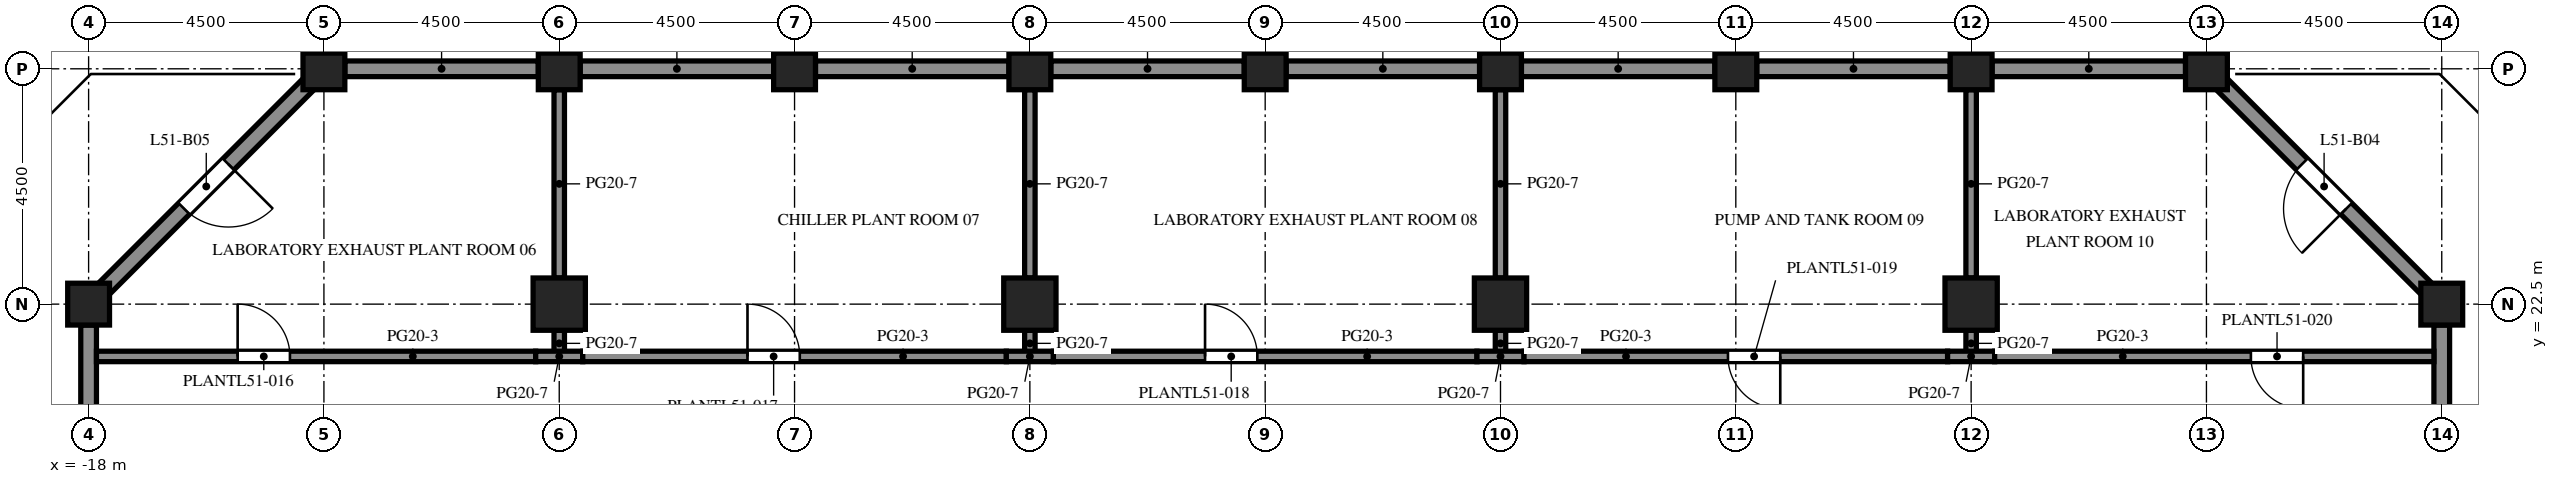
"""IFC4 building model, lengths in metres.
Left out: names, types, materials, properties, quantities, classifications, styles, units other than length and angle.
Written with IfcOpenShell. Run it as: python <this file> out.ifc"""

import sys

from ifc_helpers import new_model, si_unit, direction, frame, frame_2d, origin, origin_2d, place, context, subcontext, project, spatial, rectangle, extrude, element, fill, save


model = new_model("IFC4")
c1 = context("Model", 3, precision=1e-05, world=origin(), true_north=direction((0.0, 1.0)))
c2 = subcontext(c1, "Body", "Model", "MODEL_VIEW")
j1 = project(units=[si_unit("LENGTHUNIT", "METRE"), si_unit("PLANEANGLEUNIT", "RADIAN")], contexts=[c1])
p1 = place(None, origin())
s1 = spatial("IfcSite", under=j1, at=p1, CompositionType="ELEMENT")
p2 = place(p1, origin())
s2 = spatial("IfcBuilding", under=s1, at=p2, CompositionType="ELEMENT")
p3 = place(p2, frame((0.0, 0.0, 226.2)))
s3 = spatial("IfcBuildingStorey", under=s2, at=p3, CompositionType="ELEMENT", Elevation=226.2)
p4 = place(p3, frame((-18.0, 22.5, -0.6), z_axis=(0.0, 0.0, 1.0), x_axis=(1.0, 0.0, 0.0)))
e1 = element("IfcColumn", 1, at=p4, inside=s3, PredefinedType="COLUMN", context=c2, shape_type="SweptSolid", body=[
    extrude(rectangle(XDim=0.8, YDim=0.8, at=origin_2d()), origin(), (0.0, 0.0, 1.0), 6.0),
])
p5 = place(p3, frame((-13.5, 27.0, 0.0), z_axis=(0.0, 0.0, 1.0), x_axis=(1.0, 0.0, 0.0)))
e2 = element("IfcColumn", 2, at=p5, inside=s3, PredefinedType="COLUMN", context=c2, shape_type="SweptSolid", body=[
    extrude(rectangle(XDim=0.8, YDim=0.8, at=origin_2d()), origin(), (0.0, 0.0, 1.0), 5.4),
])
p6 = place(p3, frame((-9.0, 27.0, 0.0), z_axis=(0.0, 0.0, 1.0), x_axis=(1.0, 0.0, 0.0)))
e3 = element("IfcColumn", 3, at=p6, inside=s3, PredefinedType="COLUMN", context=c2, shape_type="SweptSolid", body=[
    extrude(rectangle(XDim=0.8, YDim=0.8, at=origin_2d()), origin(), (0.0, 0.0, 1.0), 4.95),
])
p7 = place(p3, frame((-4.5, 27.0, 0.0), z_axis=(0.0, 0.0, 1.0), x_axis=(1.0, 0.0, 0.0)))
e4 = element("IfcColumn", 4, at=p7, inside=s3, PredefinedType="COLUMN", context=c2, shape_type="SweptSolid", body=[
    extrude(rectangle(XDim=0.8, YDim=0.8, at=origin_2d()), origin(), (0.0, 0.0, 1.0), 5.4),
])
p8 = place(p3, frame((0.0, 27.0, 0.0), z_axis=(0.0, 0.0, 1.0), x_axis=(1.0, 0.0, 0.0)))
e5 = element("IfcColumn", 5, at=p8, inside=s3, PredefinedType="COLUMN", context=c2, shape_type="SweptSolid", body=[
    extrude(rectangle(XDim=0.8, YDim=0.8, at=origin_2d()), origin(), (0.0, 0.0, 1.0), 4.95),
])
p9 = place(p3, frame((4.5, 27.0, 0.0), z_axis=(0.0, 0.0, 1.0), x_axis=(1.0, 0.0, 0.0)))
e6 = element("IfcColumn", 6, at=p9, inside=s3, PredefinedType="COLUMN", context=c2, shape_type="SweptSolid", body=[
    extrude(rectangle(XDim=0.8, YDim=0.8, at=origin_2d()), origin(), (0.0, 0.0, 1.0), 5.4),
])
p10 = place(p3, frame((9.0, 27.0, 0.0), z_axis=(0.0, 0.0, 1.0), x_axis=(1.0, 0.0, 0.0)))
e7 = element("IfcColumn", 7, at=p10, inside=s3, PredefinedType="COLUMN", context=c2, shape_type="SweptSolid", body=[
    extrude(rectangle(XDim=0.8, YDim=0.8, at=origin_2d()), origin(), (0.0, 0.0, 1.0), 4.95),
])
p11 = place(p3, frame((13.5, 27.0, 0.0), z_axis=(0.0, 0.0, 1.0), x_axis=(1.0, 0.0, 0.0)))
e8 = element("IfcColumn", 8, at=p11, inside=s3, PredefinedType="COLUMN", context=c2, shape_type="SweptSolid", body=[
    extrude(rectangle(XDim=0.8, YDim=0.8, at=origin_2d()), origin(), (0.0, 0.0, 1.0), 5.4),
])
p12 = place(p3, frame((18.0, 27.0, 0.0), z_axis=(0.0, 0.0, 1.0), x_axis=(1.0, 0.0, 0.0)))
e9 = element("IfcColumn", 9, at=p12, inside=s3, PredefinedType="COLUMN", context=c2, shape_type="SweptSolid", body=[
    extrude(rectangle(XDim=0.8, YDim=0.8, at=origin_2d()), origin(), (0.0, 0.0, 1.0), 4.95),
])
p13 = place(p3, frame((22.5, 27.0, 0.0), z_axis=(0.0, 0.0, 1.0), x_axis=(1.0, 0.0, 0.0)))
e10 = element("IfcColumn", 10, at=p13, inside=s3, PredefinedType="COLUMN", context=c2, shape_type="SweptSolid", body=[
    extrude(rectangle(XDim=0.8, YDim=0.8, at=origin_2d()), origin(), (0.0, 0.0, 1.0), 5.4),
])
p14 = place(p3, frame((27.0, 22.5, -0.6), z_axis=(0.0, 0.0, 1.0), x_axis=(1.0, 0.0, 0.0)))
e11 = element("IfcColumn", 11, at=p14, inside=s3, PredefinedType="COLUMN", context=c2, shape_type="SweptSolid", body=[
    extrude(rectangle(XDim=0.8, YDim=0.8, at=origin_2d()), origin(), (0.0, 0.0, 1.0), 6.0),
])
for number, where, z_axis, x_axis in (
    (12, (-9.0, 22.5, 0.0), (0.0, 0.0, 1.0), (1.0, 0.0, 0.0)),
    (13, (0.0, 22.5, 0.0), (0.0, 0.0, 1.0), (1.0, 0.0, 0.0)),
    (14, (9.0, 22.5, 0.0), (0.0, 0.0, 1.0), (1.0, 0.0, 0.0)),
    (15, (18.0, 22.5, 0.0), (0.0, 0.0, 1.0), (1.0, 0.0, 0.0)),
):
    element("IfcColumn", number, at=place(p3, frame(where, z_axis=z_axis, x_axis=x_axis)), inside=s3, PredefinedType="COLUMN", context=c2, shape_type="SweptSolid", body=[
        extrude(rectangle(XDim=1.0, YDim=1.0, at=origin_2d()), origin(), (0.0, 0.0, 1.0), 4.95),
    ])
p15 = place(p3, frame((27.0, 22.1, 0.0), z_axis=(0.0, 0.0, 1.0), x_axis=(0.0, -1.0, 0.0)))
e16 = element("IfcWall", 16, at=p15, inside=s3, PredefinedType="SOLIDWALL", context=c2, shape_type="SweptSolid", body=[
    extrude(rectangle(XDim=3.7, YDim=0.3, at=frame_2d((1.85, 0.0))), origin(), (0.0, 0.0, 1.0), 3.75),
])
p16 = place(p3, frame((22.794, 26.706, 0.0), z_axis=(0.0, 0.0, 1.0), x_axis=(0.707106781187, -0.707106781187, 0.0)))
e17 = element("IfcWall", 17, at=p16, inside=s3, PredefinedType="SOLIDWALL", context=c2, shape_type="SweptSolid", body=[
    extrude(rectangle(XDim=5.532, YDim=0.3, at=frame_2d((2.766, 0.0))), origin(), (0.0, 0.0, 1.0), 3.75),
])
p17 = place(p16, frame((2.166, 0.0, 0.0)))
e18 = element("IfcOpeningElement", 18, at=p17, cuts=e17, PredefinedType="OPENING", context=c2, shape_type="SweptSolid", body=[
    extrude(rectangle(XDim=1.2, YDim=2.2, at=frame_2d((0.6, 1.1))), frame((0.0, 0.16, 0.0), z_axis=(0.0, -1.0, 0.0), x_axis=(1.0, 0.0, 0.0)), (0.0, 0.0, 1.0), 0.32),
])
for number, where, z_axis, x_axis in (
    (19, (18.4, 27.0, 0.0), (0.0, 0.0, 1.0), (1.0, 0.0, 0.0)),
    (20, (13.9, 27.0, 0.0), (0.0, 0.0, 1.0), (1.0, 0.0, 0.0)),
    (21, (9.4, 27.0, 0.0), (0.0, 0.0, 1.0), (1.0, 0.0, 0.0)),
    (22, (4.9, 27.0, 0.0), (0.0, 0.0, 1.0), (1.0, 0.0, 0.0)),
    (23, (0.4, 27.0, 0.0), (0.0, 0.0, 1.0), (1.0, 0.0, 0.0)),
    (24, (-4.1, 27.0, 0.0), (0.0, 0.0, 1.0), (1.0, 0.0, 0.0)),
    (25, (-8.6, 27.0, 0.0), (0.0, 0.0, 1.0), (1.0, 0.0, 0.0)),
    (26, (-13.1, 27.0, 0.0), (0.0, 0.0, 1.0), (1.0, 0.0, 0.0)),
):
    element("IfcWall", number, at=place(p3, frame(where, z_axis=z_axis, x_axis=x_axis)), inside=s3, PredefinedType="SOLIDWALL", context=c2, shape_type="SweptSolid", body=[
        extrude(rectangle(XDim=3.7, YDim=0.3, at=frame_2d((1.85, 0.0))), origin(), (0.0, 0.0, 1.0), 3.15),
    ])
p18 = place(p3, frame((-17.706, 22.794, 0.0), z_axis=(0.0, 0.0, 1.0), x_axis=(0.707106781187, 0.707106781187, 0.0)))
e27 = element("IfcWall", 27, at=p18, inside=s3, PredefinedType="SOLIDWALL", context=c2, shape_type="SweptSolid", body=[
    extrude(rectangle(XDim=5.532, YDim=0.3, at=frame_2d((2.766, 0.0))), origin(), (0.0, 0.0, 1.0), 3.75),
])
p19 = place(p18, frame((2.166, 0.0, 0.0)))
e28 = element("IfcOpeningElement", 28, at=p19, cuts=e27, PredefinedType="OPENING", context=c2, shape_type="SweptSolid", body=[
    extrude(rectangle(XDim=1.2, YDim=2.2, at=frame_2d((0.6, 1.1))), frame((0.0, 0.16, 0.0), z_axis=(0.0, -1.0, 0.0), x_axis=(1.0, 0.0, 0.0)), (0.0, 0.0, 1.0), 0.32),
])
p20 = place(p3, frame((-18.0, 18.4, 0.0), z_axis=(0.0, 0.0, 1.0), x_axis=(0.0, 1.0, 0.0)))
e29 = element("IfcWall", 29, at=p20, inside=s3, PredefinedType="SOLIDWALL", context=c2, shape_type="SweptSolid", body=[
    extrude(rectangle(XDim=3.7, YDim=0.3, at=frame_2d((1.85, 0.0))), origin(), (0.0, 0.0, 1.0), 3.75),
])
p21 = place(p3, frame((-9.0, 21.5, 0.0), z_axis=(0.0, 0.0, 1.0), x_axis=(0.0, 1.0, 0.0)))
e30 = element("IfcWall", 30, at=p21, inside=s3, PredefinedType="PARTITIONING", context=c2, shape_type="SweptSolid", body=[
    extrude(rectangle(XDim=0.5, YDim=0.2, at=frame_2d((0.25, 0.0))), origin(), (0.0, 0.0, 1.0), 3.12),
])
p22 = place(p3, frame((-9.0, 23.0, 0.0), z_axis=(0.0, 0.0, 1.0), x_axis=(0.0, 1.0, 0.0)))
e31 = element("IfcWall", 31, at=p22, inside=s3, PredefinedType="PARTITIONING", context=c2, shape_type="SweptSolid", body=[
    extrude(rectangle(XDim=3.6, YDim=0.2, at=frame_2d((1.8, 0.0))), origin(), (0.0, 0.0, 1.0), 3.12),
])
p23 = place(p3, frame((0.0, 21.5, 0.0), z_axis=(0.0, 0.0, 1.0), x_axis=(0.0, 1.0, 0.0)))
e32 = element("IfcWall", 32, at=p23, inside=s3, PredefinedType="PARTITIONING", context=c2, shape_type="SweptSolid", body=[
    extrude(rectangle(XDim=0.5, YDim=0.2, at=frame_2d((0.25, 0.0))), origin(), (0.0, 0.0, 1.0), 3.12),
])
p24 = place(p3, frame((0.0, 23.0, 0.0), z_axis=(0.0, 0.0, 1.0), x_axis=(0.0, 1.0, 0.0)))
e33 = element("IfcWall", 33, at=p24, inside=s3, PredefinedType="PARTITIONING", context=c2, shape_type="SweptSolid", body=[
    extrude(rectangle(XDim=3.6, YDim=0.2, at=frame_2d((1.8, 0.0))), origin(), (0.0, 0.0, 1.0), 3.12),
])
p25 = place(p3, frame((9.0, 21.5, 0.0), z_axis=(0.0, 0.0, 1.0), x_axis=(0.0, 1.0, 0.0)))
e34 = element("IfcWall", 34, at=p25, inside=s3, PredefinedType="PARTITIONING", context=c2, shape_type="SweptSolid", body=[
    extrude(rectangle(XDim=0.5, YDim=0.2, at=frame_2d((0.25, 0.0))), origin(), (0.0, 0.0, 1.0), 3.12),
])
p26 = place(p3, frame((9.0, 23.0, 0.0), z_axis=(0.0, 0.0, 1.0), x_axis=(0.0, 1.0, 0.0)))
e35 = element("IfcWall", 35, at=p26, inside=s3, PredefinedType="PARTITIONING", context=c2, shape_type="SweptSolid", body=[
    extrude(rectangle(XDim=3.6, YDim=0.2, at=frame_2d((1.8, 0.0))), origin(), (0.0, 0.0, 1.0), 3.12),
])
p27 = place(p3, frame((18.0, 21.5, 0.0), z_axis=(0.0, 0.0, 1.0), x_axis=(0.0, 1.0, 0.0)))
e36 = element("IfcWall", 36, at=p27, inside=s3, PredefinedType="PARTITIONING", context=c2, shape_type="SweptSolid", body=[
    extrude(rectangle(XDim=0.5, YDim=0.2, at=frame_2d((0.25, 0.0))), origin(), (0.0, 0.0, 1.0), 3.12),
])
p28 = place(p3, frame((18.0, 23.0, 0.0), z_axis=(0.0, 0.0, 1.0), x_axis=(0.0, 1.0, 0.0)))
e37 = element("IfcWall", 37, at=p28, inside=s3, PredefinedType="PARTITIONING", context=c2, shape_type="SweptSolid", body=[
    extrude(rectangle(XDim=3.6, YDim=0.2, at=frame_2d((1.8, 0.0))), origin(), (0.0, 0.0, 1.0), 3.12),
])
p29 = place(p3, frame((-17.85, 21.5, 0.0), z_axis=(0.0, 0.0, 1.0), x_axis=(1.0, 0.0, 0.0)))
e38 = element("IfcWall", 38, at=p29, inside=s3, PredefinedType="PARTITIONING", context=c2, shape_type="SweptSolid", body=[
    extrude(rectangle(XDim=8.4, YDim=0.2, at=frame_2d((4.2, 0.0))), origin(), (0.0, 0.0, 1.0), 4.95),
])
p30 = place(p29, frame((2.7, 0.0, 0.0)))
e39 = element("IfcOpeningElement", 39, at=p30, cuts=e38, PredefinedType="OPENING", context=c2, shape_type="SweptSolid", body=[
    extrude(rectangle(XDim=1.0, YDim=2.1, at=frame_2d((0.5, 1.05))), frame((0.0, 0.11, 0.0), z_axis=(0.0, -1.0, 0.0), x_axis=(1.0, 0.0, 0.0)), (0.0, 0.0, 1.0), 0.22),
])
p31 = place(p3, frame((-9.45, 21.5, 0.0), z_axis=(0.0, 0.0, 1.0), x_axis=(1.0, 0.0, 0.0)))
e40 = element("IfcWall", 40, at=p31, inside=s3, PredefinedType="PARTITIONING", context=c2, shape_type="SweptSolid", body=[
    extrude(rectangle(XDim=0.9, YDim=0.2, at=frame_2d((0.45, 0.0))), origin(), (0.0, 0.0, 1.0), 3.12),
])
p32 = place(p3, frame((-8.55, 21.5, 0.0), z_axis=(0.0, 0.0, 1.0), x_axis=(1.0, 0.0, 0.0)))
e41 = element("IfcWall", 41, at=p32, inside=s3, PredefinedType="PARTITIONING", context=c2, shape_type="SweptSolid", body=[
    extrude(rectangle(XDim=8.1, YDim=0.2, at=frame_2d((4.05, 0.0))), origin(), (0.0, 0.0, 1.0), 4.95),
])
p33 = place(p32, frame((3.15, 0.0, 0.0)))
e42 = element("IfcOpeningElement", 42, at=p33, cuts=e41, PredefinedType="OPENING", context=c2, shape_type="SweptSolid", body=[
    extrude(rectangle(XDim=1.0, YDim=2.1, at=frame_2d((0.5, 1.05))), frame((0.0, 0.11, 0.0), z_axis=(0.0, -1.0, 0.0), x_axis=(1.0, 0.0, 0.0)), (0.0, 0.0, 1.0), 0.22),
])
p34 = place(p3, frame((-0.45, 21.5, 0.0), z_axis=(0.0, 0.0, 1.0), x_axis=(1.0, 0.0, 0.0)))
e43 = element("IfcWall", 43, at=p34, inside=s3, PredefinedType="PARTITIONING", context=c2, shape_type="SweptSolid", body=[
    extrude(rectangle(XDim=0.9, YDim=0.2, at=frame_2d((0.45, 0.0))), origin(), (0.0, 0.0, 1.0), 3.12),
])
p35 = place(p3, frame((0.45, 21.5, 0.0), z_axis=(0.0, 0.0, 1.0), x_axis=(1.0, 0.0, 0.0)))
e44 = element("IfcWall", 44, at=p35, inside=s3, PredefinedType="PARTITIONING", context=c2, shape_type="SweptSolid", body=[
    extrude(rectangle(XDim=8.1, YDim=0.2, at=frame_2d((4.05, 0.0))), origin(), (0.0, 0.0, 1.0), 4.95),
])
p36 = place(p35, frame((2.9, 0.0, 0.0)))
e45 = element("IfcOpeningElement", 45, at=p36, cuts=e44, PredefinedType="OPENING", context=c2, shape_type="SweptSolid", body=[
    extrude(rectangle(XDim=1.0, YDim=2.1, at=frame_2d((0.5, 1.05))), frame((0.0, 0.11, 0.0), z_axis=(0.0, -1.0, 0.0), x_axis=(1.0, 0.0, 0.0)), (0.0, 0.0, 1.0), 0.22),
])
p37 = place(p3, frame((8.55, 21.5, 0.0), z_axis=(0.0, 0.0, 1.0), x_axis=(1.0, 0.0, 0.0)))
e46 = element("IfcWall", 46, at=p37, inside=s3, PredefinedType="PARTITIONING", context=c2, shape_type="SweptSolid", body=[
    extrude(rectangle(XDim=0.9, YDim=0.2, at=frame_2d((0.45, 0.0))), origin(), (0.0, 0.0, 1.0), 3.12),
])
p38 = place(p3, frame((9.45, 21.5, 0.0), z_axis=(0.0, 0.0, 1.0), x_axis=(1.0, 0.0, 0.0)))
e47 = element("IfcWall", 47, at=p38, inside=s3, PredefinedType="PARTITIONING", context=c2, shape_type="SweptSolid", body=[
    extrude(rectangle(XDim=8.1, YDim=0.2, at=frame_2d((4.05, 0.0))), origin(), (0.0, 0.0, 1.0), 4.95),
])
p39 = place(p38, frame((3.9, 0.0, 0.0)))
e48 = element("IfcOpeningElement", 48, at=p39, cuts=e47, PredefinedType="OPENING", context=c2, shape_type="SweptSolid", body=[
    extrude(rectangle(XDim=1.0, YDim=2.1, at=frame_2d((0.5, 1.05))), frame((0.0, 0.11, 0.0), z_axis=(0.0, -1.0, 0.0), x_axis=(1.0, 0.0, 0.0)), (0.0, 0.0, 1.0), 0.22),
])
p40 = place(p3, frame((17.55, 21.5, 0.0), z_axis=(0.0, 0.0, 1.0), x_axis=(1.0, 0.0, 0.0)))
e49 = element("IfcWall", 49, at=p40, inside=s3, PredefinedType="PARTITIONING", context=c2, shape_type="SweptSolid", body=[
    extrude(rectangle(XDim=0.9, YDim=0.2, at=frame_2d((0.45, 0.0))), origin(), (0.0, 0.0, 1.0), 3.12),
])
p41 = place(p3, frame((18.45, 21.5, 0.0), z_axis=(0.0, 0.0, 1.0), x_axis=(1.0, 0.0, 0.0)))
e50 = element("IfcWall", 50, at=p41, inside=s3, PredefinedType="PARTITIONING", context=c2, shape_type="SweptSolid", body=[
    extrude(rectangle(XDim=8.4, YDim=0.2, at=frame_2d((4.2, 0.0))), origin(), (0.0, 0.0, 1.0), 4.95),
])
p42 = place(p41, frame((4.9, 0.0, 0.0)))
e51 = element("IfcOpeningElement", 51, at=p42, cuts=e50, PredefinedType="OPENING", context=c2, shape_type="SweptSolid", body=[
    extrude(rectangle(XDim=1.0, YDim=2.1, at=frame_2d((0.5, 1.05))), frame((0.0, 0.11, 0.0), z_axis=(0.0, -1.0, 0.0), x_axis=(1.0, 0.0, 0.0)), (0.0, 0.0, 1.0), 0.22),
])
p43 = place(p17, origin())
e52 = element("IfcDoor", 52, at=p43, inside=s3, OperationType="SINGLE_SWING_RIGHT", PredefinedType="DOOR", context=c2, shape_type="SweptSolid", body=[
    extrude(rectangle(XDim=1.2, YDim=2.2, at=frame_2d((0.6, 1.1))), frame((0.0, 0.025, 0.0), z_axis=(0.0, -1.0, 0.0), x_axis=(1.0, 0.0, 0.0)), (0.0, 0.0, 1.0), 0.05),
])
fill(e18, e52)
p44 = place(p19, origin())
e53 = element("IfcDoor", 53, at=p44, inside=s3, OperationType="SINGLE_SWING_RIGHT", PredefinedType="DOOR", context=c2, shape_type="SweptSolid", body=[
    extrude(rectangle(XDim=1.2, YDim=2.2, at=frame_2d((0.6, 1.1))), frame((0.0, 0.025, 0.0), z_axis=(0.0, -1.0, 0.0), x_axis=(1.0, 0.0, 0.0)), (0.0, 0.0, 1.0), 0.05),
])
fill(e28, e53)
p45 = place(p30, origin())
e54 = element("IfcDoor", 54, at=p45, inside=s3, OperationType="SINGLE_SWING_LEFT", PredefinedType="DOOR", context=c2, shape_type="SweptSolid", body=[
    extrude(rectangle(XDim=1.0, YDim=2.1, at=frame_2d((0.5, 1.05))), frame((0.0, 0.025, 0.0), z_axis=(0.0, -1.0, 0.0), x_axis=(1.0, 0.0, 0.0)), (0.0, 0.0, 1.0), 0.05),
])
fill(e39, e54)
p46 = place(p33, origin())
e55 = element("IfcDoor", 55, at=p46, inside=s3, OperationType="SINGLE_SWING_LEFT", PredefinedType="DOOR", context=c2, shape_type="SweptSolid", body=[
    extrude(rectangle(XDim=1.0, YDim=2.1, at=frame_2d((0.5, 1.05))), frame((0.0, 0.025, 0.0), z_axis=(0.0, -1.0, 0.0), x_axis=(1.0, 0.0, 0.0)), (0.0, 0.0, 1.0), 0.05),
])
fill(e42, e55)
p47 = place(p36, origin())
e56 = element("IfcDoor", 56, at=p47, inside=s3, OperationType="SINGLE_SWING_LEFT", PredefinedType="DOOR", context=c2, shape_type="SweptSolid", body=[
    extrude(rectangle(XDim=1.0, YDim=2.1, at=frame_2d((0.5, 1.05))), frame((0.0, 0.025, 0.0), z_axis=(0.0, -1.0, 0.0), x_axis=(1.0, 0.0, 0.0)), (0.0, 0.0, 1.0), 0.05),
])
fill(e45, e56)
p48 = place(p39, origin())
e57 = element("IfcDoor", 57, at=p48, inside=s3, OperationType="SINGLE_SWING_RIGHT", PredefinedType="DOOR", context=c2, shape_type="SweptSolid", body=[
    extrude(rectangle(XDim=1.0, YDim=2.1, at=frame_2d((0.5, 1.05))), frame((0.0, 0.025, 0.0), z_axis=(0.0, -1.0, 0.0), x_axis=(1.0, 0.0, 0.0)), (0.0, 0.0, 1.0), 0.05),
])
fill(e48, e57)
p49 = place(p42, origin())
e58 = element("IfcDoor", 58, at=p49, inside=s3, OperationType="SINGLE_SWING_RIGHT", PredefinedType="DOOR", context=c2, shape_type="SweptSolid", body=[
    extrude(rectangle(XDim=1.0, YDim=2.1, at=frame_2d((0.5, 1.05))), frame((0.0, 0.025, 0.0), z_axis=(0.0, -1.0, 0.0), x_axis=(1.0, 0.0, 0.0)), (0.0, 0.0, 1.0), 0.05),
])
fill(e51, e58)
save(model, sys.argv[1])
